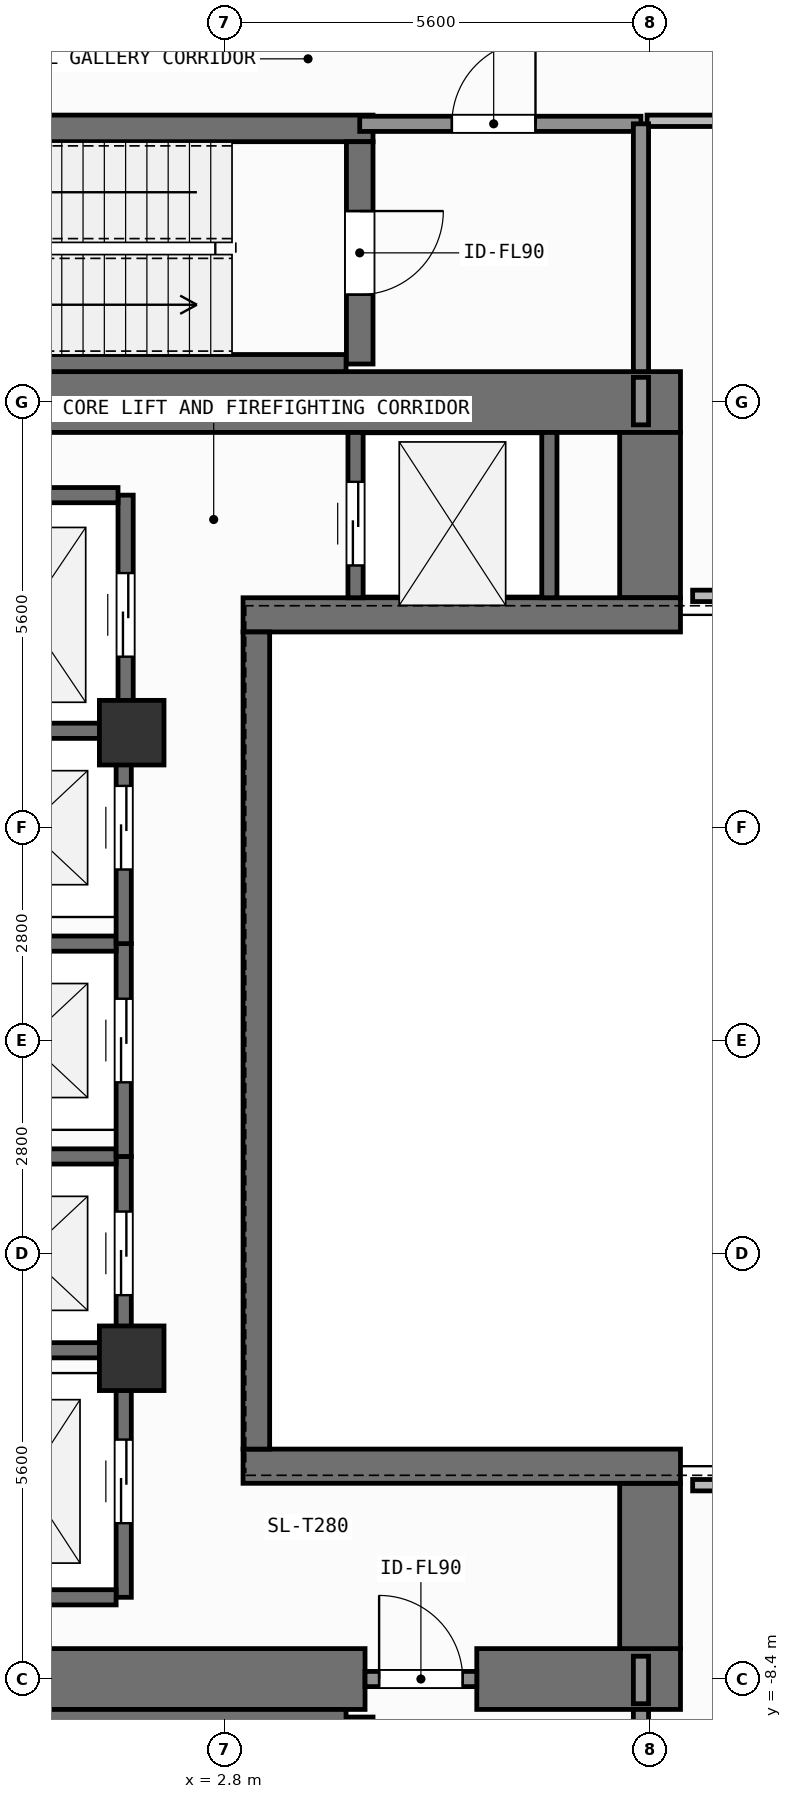
"""IFC4 building model, lengths in metres.
Left out: names, types, materials, properties, quantities, classifications, styles, units other than length and angle.
Written with IfcOpenShell. Run it as: python <this file> out.ifc"""

import sys

from ifc_helpers import new_model, si_unit, direction, frame, frame_2d, origin, origin_2d, place, context, subcontext, project, spatial, rectangle, extrude, element, fill, save


model = new_model("IFC4")
c1 = context("Model", 3, precision=1e-05, world=origin(), true_north=direction((0.0, 1.0)))
c2 = subcontext(c1, "Body", "Model", "MODEL_VIEW")
j1 = project(units=[si_unit("LENGTHUNIT", "METRE"), si_unit("PLANEANGLEUNIT", "RADIAN")], contexts=[c1])
p1 = place(None, origin())
s1 = spatial("IfcSite", under=j1, at=p1, CompositionType="ELEMENT")
p2 = place(p1, origin())
s2 = spatial("IfcBuilding", under=s1, at=p2, CompositionType="ELEMENT")
p3 = place(p2, frame((0.0, 0.0, 219.6)))
s3 = spatial("IfcBuildingStorey", under=s2, at=p3, CompositionType="ELEMENT", Elevation=219.6)
p4 = place(p3, frame((-2.62, -8.4, 0.0), z_axis=(0.0, 0.0, 1.0), x_axis=(1.0, 0.0, 0.0)))
e1 = element("IfcWall", 1, at=p4, inside=s3, PredefinedType="SHEAR", context=c2, shape_type="SweptSolid", body=[
    extrude(rectangle(XDim=7.27, YDim=0.8, at=frame_2d((3.635, 0.0))), origin(), (0.0, 0.0, 1.0), 3.9),
])
p5 = place(p3, frame((6.12, -8.4, 0.0), z_axis=(0.0, 0.0, 1.0), x_axis=(1.0, 0.0, 0.0)))
e2 = element("IfcWall", 2, at=p5, inside=s3, PredefinedType="SHEAR", context=c2, shape_type="SweptSolid", body=[
    extrude(rectangle(XDim=2.68, YDim=0.8, at=frame_2d((1.34, 0.0))), origin(), (0.0, 0.0, 1.0), 3.9),
])
p6 = place(p3, frame((-7.55, 8.4, 0.0), z_axis=(0.0, 0.0, 1.0), x_axis=(1.0, 0.0, 0.0)))
e3 = element("IfcWall", 3, at=p6, inside=s3, PredefinedType="SHEAR", context=c2, shape_type="SweptSolid", body=[
    extrude(rectangle(XDim=16.35, YDim=0.8, at=frame_2d((8.175, 0.0))), origin(), (0.0, 0.0, 1.0), 3.9),
])
for number, where, z_axis, x_axis in (
    (4, (8.4, -8.0, 0.0), (0.0, 0.0, 1.0), (0.0, 1.0, 0.0)),
    (5, (8.4, 5.825, 0.0), (0.0, 0.0, 1.0), (0.0, 1.0, 0.0)),
):
    element("IfcWall", number, at=place(p3, frame(where, z_axis=z_axis, x_axis=x_axis)), inside=s3, PredefinedType="SHEAR", context=c2, shape_type="SweptSolid", body=[
        extrude(rectangle(XDim=2.175, YDim=0.8, at=frame_2d((1.087, 0.0))), origin(), (0.0, 0.0, 1.0), 3.9),
    ])
for number, where, z_axis, x_axis in (
    (6, (3.045, -5.6, 0.0), (0.0, 0.0, 1.0), (1.0, 0.0, 0.0)),
    (7, (3.045, 5.6, 0.0), (0.0, 0.0, 1.0), (1.0, 0.0, 0.0)),
):
    element("IfcWall", number, at=place(p3, frame(where, z_axis=z_axis, x_axis=x_axis)), inside=s3, PredefinedType="SHEAR", context=c2, shape_type="SweptSolid", body=[
        extrude(rectangle(XDim=5.755, YDim=0.45, at=frame_2d((2.877, 0.0))), origin(), (0.0, 0.0, 1.0), 3.9),
    ])
p7 = place(p3, frame((3.22, -5.375, 0.0), z_axis=(0.0, 0.0, 1.0), x_axis=(0.0, 1.0, 0.0)))
e8 = element("IfcWall", 8, at=p7, inside=s3, PredefinedType="SHEAR", context=c2, shape_type="SweptSolid", body=[
    extrude(rectangle(XDim=10.75, YDim=0.35, at=frame_2d((5.375, 0.0))), origin(), (0.0, 0.0, 1.0), 3.9),
])
p8 = place(p3, frame((-2.2, -8.913, 0.0), z_axis=(0.0, 0.0, 1.0), x_axis=(1.0, 0.0, 0.0)))
e9 = element("IfcWall", 9, at=p8, inside=s3, PredefinedType="SHEAR", context=c2, shape_type="SweptSolid", body=[
    extrude(rectangle(XDim=6.6, YDim=0.225, at=frame_2d((3.3, 0.0))), origin(), (0.0, 0.0, 1.0), 3.9),
])
p9 = place(p3, frame((4.58, -8.9, 0.0), z_axis=(0.0, 0.0, 1.0), x_axis=(0.0, -1.0, 0.0)))
e10 = element("IfcWall", 10, at=p9, inside=s3, PredefinedType="SHEAR", context=c2, shape_type="SweptSolid", body=[
    extrude(rectangle(XDim=2.925, YDim=0.35, at=frame_2d((1.462, 0.0))), origin(), (0.0, 0.0, 1.0), 3.9),
])
p10 = place(p9, frame((0.913, 0.0, 0.0)))
e11 = element("IfcOpeningElement", 11, at=p10, cuts=e10, PredefinedType="OPENING", context=c2, shape_type="SweptSolid", body=[
    extrude(rectangle(XDim=1.1, YDim=2.15, at=frame_2d((0.55, 1.075))), frame((0.0, 0.185, 0.0), z_axis=(0.0, -1.0, 0.0), x_axis=(1.0, 0.0, 0.0)), (0.0, 0.0, 1.0), 0.37),
])
p11 = place(p3, frame((-2.555, 12.0, 0.0), z_axis=(0.0, 0.0, 1.0), x_axis=(1.0, 0.0, 0.0)))
e12 = element("IfcWall", 12, at=p11, inside=s3, PredefinedType="SHEAR", context=c2, shape_type="SweptSolid", body=[
    extrude(rectangle(XDim=7.31, YDim=0.35, at=frame_2d((3.655, 0.0))), origin(), (0.0, 0.0, 1.0), 3.9),
])
p12 = place(p3, frame((-2.2, 8.913, 0.0), z_axis=(0.0, 0.0, 1.0), x_axis=(1.0, 0.0, 0.0)))
e13 = element("IfcWall", 13, at=p12, inside=s3, PredefinedType="SHEAR", context=c2, shape_type="SweptSolid", body=[
    extrude(rectangle(XDim=6.6, YDim=0.225, at=frame_2d((3.3, 0.0))), origin(), (0.0, 0.0, 1.0), 3.9),
])
p13 = place(p3, frame((4.58, 11.825, 0.0), z_axis=(0.0, 0.0, 1.0), x_axis=(0.0, -1.0, 0.0)))
e14 = element("IfcWall", 14, at=p13, inside=s3, PredefinedType="SHEAR", context=c2, shape_type="SweptSolid", body=[
    extrude(rectangle(XDim=2.925, YDim=0.35, at=frame_2d((1.462, 0.0))), origin(), (0.0, 0.0, 1.0), 3.9),
])
p14 = place(p13, frame((0.913, 0.0, 0.0)))
e15 = element("IfcOpeningElement", 15, at=p14, cuts=e14, PredefinedType="OPENING", context=c2, shape_type="SweptSolid", body=[
    extrude(rectangle(XDim=1.1, YDim=2.15, at=frame_2d((0.55, 1.075))), frame((0.0, 0.185, 0.0), z_axis=(0.0, -1.0, 0.0), x_axis=(1.0, 0.0, 0.0)), (0.0, 0.0, 1.0), 0.37),
])
for number, where, z_axis, x_axis in (
    (16, (1.58, -4.18, 0.0), (0.0, 0.0, 1.0), (1.0, 0.0, 0.0)),
    (17, (1.58, 4.05, 0.0), (0.0, 0.0, 1.0), (1.0, 0.0, 0.0)),
):
    element("IfcColumn", number, at=place(p3, frame(where, z_axis=z_axis, x_axis=x_axis)), inside=s3, PredefinedType="COLUMN", context=c2, shape_type="SweptSolid", body=[
        extrude(rectangle(XDim=0.85, YDim=0.85, at=origin_2d()), origin(), (0.0, 0.0, 1.0), 3.9),
    ])
p15 = place(p3, frame((1.475, -4.275, 0.0), z_axis=(0.0, 0.0, 1.0), x_axis=(0.0, 1.0, 0.0)))
e18 = element("IfcWall", 18, at=p15, inside=s3, PredefinedType="SHEAR", context=c2, shape_type="SweptSolid", body=[
    extrude(rectangle(XDim=2.75, YDim=0.2, at=frame_2d((1.375, 0.0))), origin(), (0.0, 0.0, 1.0), 3.68),
])
p16 = place(p15, frame((0.925, 0.0, 0.0)))
e19 = element("IfcOpeningElement", 19, at=p16, cuts=e18, PredefinedType="OPENING", context=c2, shape_type="SweptSolid", body=[
    extrude(rectangle(XDim=1.1, YDim=2.2, at=frame_2d((0.55, 1.1))), frame((0.0, 0.11, 0.0), z_axis=(0.0, -1.0, 0.0), x_axis=(1.0, 0.0, 0.0)), (0.0, 0.0, 1.0), 0.22),
])
for number, where, z_axis, x_axis in (
    (20, (-0.975, -4.075, 0.0), (0.0, 0.0, 1.0), (1.0, 0.0, 0.0)),
    (21, (-0.975, -1.525, 0.0), (0.0, 0.0, 1.0), (1.0, 0.0, 0.0)),
):
    element("IfcWall", number, at=place(p3, frame(where, z_axis=z_axis, x_axis=x_axis)), inside=s3, PredefinedType="SHEAR", context=c2, shape_type="SweptSolid", body=[
        extrude(rectangle(XDim=2.35, YDim=0.2, at=frame_2d((1.175, 0.0))), origin(), (0.0, 0.0, 1.0), 3.68),
    ])
p17 = place(p3, frame((1.475, -1.525, 0.0), z_axis=(0.0, 0.0, 1.0), x_axis=(0.0, 1.0, 0.0)))
e22 = element("IfcWall", 22, at=p17, inside=s3, PredefinedType="SHEAR", context=c2, shape_type="SweptSolid", body=[
    extrude(rectangle(XDim=2.8, YDim=0.2, at=frame_2d((1.4, 0.0))), origin(), (0.0, 0.0, 1.0), 3.68),
])
p18 = place(p17, frame((0.975, 0.0, 0.0)))
e23 = element("IfcOpeningElement", 23, at=p18, cuts=e22, PredefinedType="OPENING", context=c2, shape_type="SweptSolid", body=[
    extrude(rectangle(XDim=1.1, YDim=2.2, at=frame_2d((0.55, 1.1))), frame((0.0, 0.11, 0.0), z_axis=(0.0, -1.0, 0.0), x_axis=(1.0, 0.0, 0.0)), (0.0, 0.0, 1.0), 0.22),
])
p19 = place(p3, frame((-0.975, 1.275, 0.0), z_axis=(0.0, 0.0, 1.0), x_axis=(1.0, 0.0, 0.0)))
e24 = element("IfcWall", 24, at=p19, inside=s3, PredefinedType="SHEAR", context=c2, shape_type="SweptSolid", body=[
    extrude(rectangle(XDim=2.35, YDim=0.2, at=frame_2d((1.175, 0.0))), origin(), (0.0, 0.0, 1.0), 3.68),
])
p20 = place(p3, frame((1.475, 1.275, 0.0), z_axis=(0.0, 0.0, 1.0), x_axis=(0.0, 1.0, 0.0)))
e25 = element("IfcWall", 25, at=p20, inside=s3, PredefinedType="SHEAR", context=c2, shape_type="SweptSolid", body=[
    extrude(rectangle(XDim=2.8, YDim=0.2, at=frame_2d((1.4, 0.0))), origin(), (0.0, 0.0, 1.0), 3.68),
])
p21 = place(p20, frame((0.975, 0.0, 0.0)))
e26 = element("IfcOpeningElement", 26, at=p21, cuts=e25, PredefinedType="OPENING", context=c2, shape_type="SweptSolid", body=[
    extrude(rectangle(XDim=1.1, YDim=2.2, at=frame_2d((0.55, 1.1))), frame((0.0, 0.11, 0.0), z_axis=(0.0, -1.0, 0.0), x_axis=(1.0, 0.0, 0.0)), (0.0, 0.0, 1.0), 0.22),
])
p22 = place(p3, frame((-0.975, 4.075, 0.0), z_axis=(0.0, 0.0, 1.0), x_axis=(1.0, 0.0, 0.0)))
e27 = element("IfcWall", 27, at=p22, inside=s3, PredefinedType="SHEAR", context=c2, shape_type="SweptSolid", body=[
    extrude(rectangle(XDim=2.35, YDim=0.2, at=frame_2d((1.175, 0.0))), origin(), (0.0, 0.0, 1.0), 3.68),
])
p23 = place(p3, frame((1.5, 4.025, 0.0), z_axis=(0.0, 0.0, 1.0), x_axis=(0.0, 1.0, 0.0)))
e28 = element("IfcWall", 28, at=p23, inside=s3, PredefinedType="SHEAR", context=c2, shape_type="SweptSolid", body=[
    extrude(rectangle(XDim=3.15, YDim=0.2, at=frame_2d((1.575, 0.0))), origin(), (0.0, 0.0, 1.0), 3.68),
])
p24 = place(p23, frame((1.025, 0.0, 0.0)))
e29 = element("IfcOpeningElement", 29, at=p24, cuts=e28, PredefinedType="OPENING", context=c2, shape_type="SweptSolid", body=[
    extrude(rectangle(XDim=1.1, YDim=2.2, at=frame_2d((0.55, 1.1))), frame((0.0, 0.11, 0.0), z_axis=(0.0, -1.0, 0.0), x_axis=(1.0, 0.0, 0.0)), (0.0, 0.0, 1.0), 0.22),
])
p25 = place(p3, frame((-1.0, 7.175, 0.0), z_axis=(0.0, 0.0, 1.0), x_axis=(1.0, 0.0, 0.0)))
e30 = element("IfcWall", 30, at=p25, inside=s3, PredefinedType="SHEAR", context=c2, shape_type="SweptSolid", body=[
    extrude(rectangle(XDim=2.4, YDim=0.2, at=frame_2d((1.2, 0.0))), origin(), (0.0, 0.0, 1.0), 3.68),
])
p26 = place(p3, frame((1.475, -7.325, 0.0), z_axis=(0.0, 0.0, 1.0), x_axis=(0.0, 1.0, 0.0)))
e31 = element("IfcWall", 31, at=p26, inside=s3, PredefinedType="SHEAR", context=c2, shape_type="SweptSolid", body=[
    extrude(rectangle(XDim=3.05, YDim=0.2, at=frame_2d((1.525, 0.0))), origin(), (0.0, 0.0, 1.0), 3.68),
])
p27 = place(p26, frame((0.975, 0.0, 0.0)))
e32 = element("IfcOpeningElement", 32, at=p27, cuts=e31, PredefinedType="OPENING", context=c2, shape_type="SweptSolid", body=[
    extrude(rectangle(XDim=1.1, YDim=2.2, at=frame_2d((0.55, 1.1))), frame((0.0, 0.11, 0.0), z_axis=(0.0, -1.0, 0.0), x_axis=(1.0, 0.0, 0.0)), (0.0, 0.0, 1.0), 0.22),
])
p28 = place(p3, frame((-0.975, -7.325, 0.0), z_axis=(0.0, 0.0, 1.0), x_axis=(1.0, 0.0, 0.0)))
e33 = element("IfcWall", 33, at=p28, inside=s3, PredefinedType="SHEAR", context=c2, shape_type="SweptSolid", body=[
    extrude(rectangle(XDim=2.35, YDim=0.2, at=frame_2d((1.175, 0.0))), origin(), (0.0, 0.0, 1.0), 3.68),
])
p29 = place(p3, frame((4.525, 5.825, 0.0), z_axis=(0.0, 0.0, 1.0), x_axis=(0.0, 1.0, 0.0)))
e34 = element("IfcWall", 34, at=p29, inside=s3, PredefinedType="SHEAR", context=c2, shape_type="SweptSolid", body=[
    extrude(rectangle(XDim=2.175, YDim=0.2, at=frame_2d((1.087, 0.0))), origin(), (0.0, 0.0, 1.0), 3.68),
])
p30 = place(p29, frame((0.425, 0.0, 0.0)))
e35 = element("IfcOpeningElement", 35, at=p30, cuts=e34, PredefinedType="OPENING", context=c2, shape_type="SweptSolid", body=[
    extrude(rectangle(XDim=1.1, YDim=2.2, at=frame_2d((0.55, 1.1))), frame((0.0, 0.11, 0.0), z_axis=(0.0, -1.0, 0.0), x_axis=(1.0, 0.0, 0.0)), (0.0, 0.0, 1.0), 0.22),
])
p31 = place(p3, frame((7.075, 5.825, 0.0), z_axis=(0.0, 0.0, 1.0), x_axis=(0.0, 1.0, 0.0)))
e36 = element("IfcWall", 36, at=p31, inside=s3, PredefinedType="SHEAR", context=c2, shape_type="SweptSolid", body=[
    extrude(rectangle(XDim=2.175, YDim=0.2, at=frame_2d((1.087, 0.0))), origin(), (0.0, 0.0, 1.0), 3.68),
])
p32 = place(p3, frame((4.65, -8.4, 0.0), z_axis=(0.0, 0.0, 1.0), x_axis=(1.0, 0.0, 0.0)))
e37 = element("IfcWall", 37, at=p32, inside=s3, PredefinedType="SOLIDWALL", context=c2, shape_type="SweptSolid", body=[
    extrude(rectangle(XDim=1.47, YDim=0.2, at=frame_2d((0.735, 0.0))), origin(), (0.0, 0.0, 1.0), 2.82),
])
p33 = place(p32, frame((0.185, 0.0, 0.0)))
e38 = element("IfcOpeningElement", 38, at=p33, cuts=e37, PredefinedType="OPENING", context=c2, shape_type="SweptSolid", body=[
    extrude(rectangle(XDim=1.1, YDim=2.15, at=frame_2d((0.55, 1.075))), frame((0.0, 0.11, 0.0), z_axis=(0.0, -1.0, 0.0), x_axis=(1.0, 0.0, 0.0)), (0.0, 0.0, 1.0), 0.22),
])
p34 = place(p3, frame((4.58, 12.06, 0.0), z_axis=(0.0, 0.0, 1.0), x_axis=(1.0, 0.0, 0.0)))
e39 = element("IfcWall", 39, at=p34, inside=s3, PredefinedType="SOLIDWALL", context=c2, shape_type="SweptSolid", body=[
    extrude(rectangle(XDim=3.7, YDim=0.2, at=frame_2d((1.85, 0.0))), origin(), (0.0, 0.0, 1.0), 3.68),
])
p35 = place(p34, frame((1.212, 0.0, 0.0)))
e40 = element("IfcOpeningElement", 40, at=p35, cuts=e39, PredefinedType="OPENING", context=c2, shape_type="SweptSolid", body=[
    extrude(rectangle(XDim=1.1, YDim=2.15, at=frame_2d((0.55, 1.075))), frame((0.0, 0.11, 0.0), z_axis=(0.0, -1.0, 0.0), x_axis=(1.0, 0.0, 0.0)), (0.0, 0.0, 1.0), 0.22),
])
p36 = place(p3, frame((8.36, 12.1, 0.0), z_axis=(0.0, 0.0, 1.0), x_axis=(1.0, 0.0, 0.0)))
e41 = element("IfcWall", 41, at=p36, inside=s3, PredefinedType="PARTITIONING", context=c2, shape_type="SweptSolid", body=[
    extrude(rectangle(XDim=7.22, YDim=0.15, at=frame_2d((3.61, 0.0))), origin(), (0.0, 0.0, 1.0), 3.68),
])
p37 = place(p36, frame((3.513, 0.0, 0.0)))
e42 = element("IfcOpeningElement", 42, at=p37, cuts=e41, PredefinedType="OPENING", context=c2, shape_type="SweptSolid", body=[
    extrude(rectangle(XDim=0.9, YDim=2.1, at=frame_2d((0.45, 1.05))), frame((0.0, 0.085, 0.0), z_axis=(0.0, -1.0, 0.0), x_axis=(1.0, 0.0, 0.0)), (0.0, 0.0, 1.0), 0.17),
])
for number, where, z_axis, x_axis in (
    (43, (8.28, -12.06, 0.0), (0.0, 0.0, 1.0), (0.0, 1.0, 0.0)),
    (44, (8.28, 8.8, 0.0), (0.0, 0.0, 1.0), (0.0, 1.0, 0.0)),
):
    element("IfcWall", number, at=place(p3, frame(where, z_axis=z_axis, x_axis=x_axis)), inside=s3, PredefinedType="SOLIDWALL", context=c2, shape_type="SweptSolid", body=[
        extrude(rectangle(XDim=3.26, YDim=0.2, at=frame_2d((1.63, 0.0))), origin(), (0.0, 0.0, 1.0), 3.68),
    ])
p38 = place(p3, frame((8.28, -8.725, 0.0), z_axis=(0.0, 0.0, 1.0), x_axis=(0.0, 1.0, 0.0)))
e45 = element("IfcWall", 45, at=p38, inside=s3, PredefinedType="SOLIDWALL", context=c2, shape_type="SweptSolid", body=[
    extrude(rectangle(XDim=0.625, YDim=0.2, at=frame_2d((0.312, 0.0))), origin(), (0.0, 0.0, 1.0), 3.68),
])
p39 = place(p3, frame((8.96, -5.85, 0.0), z_axis=(0.0, 0.0, 1.0), x_axis=(1.0, 0.0, 0.0)))
e46 = element("IfcWall", 46, at=p39, inside=s3, PredefinedType="PARTITIONING", context=c2, shape_type="SweptSolid", body=[
    extrude(rectangle(XDim=6.62, YDim=0.15, at=frame_2d((3.31, 0.0))), origin(), (0.0, 0.0, 1.0), 3.68),
])
p40 = place(p3, frame((8.28, 8.1, 0.0), z_axis=(0.0, 0.0, 1.0), x_axis=(0.0, 1.0, 0.0)))
e47 = element("IfcWall", 47, at=p40, inside=s3, PredefinedType="SOLIDWALL", context=c2, shape_type="SweptSolid", body=[
    extrude(rectangle(XDim=0.625, YDim=0.2, at=frame_2d((0.312, 0.0))), origin(), (0.0, 0.0, 1.0), 3.68),
])
p41 = place(p3, frame((8.96, 5.85, 0.0), z_axis=(0.0, 0.0, 1.0), x_axis=(1.0, 0.0, 0.0)))
e48 = element("IfcWall", 48, at=p41, inside=s3, PredefinedType="PARTITIONING", context=c2, shape_type="SweptSolid", body=[
    extrude(rectangle(XDim=6.62, YDim=0.15, at=frame_2d((3.31, 0.0))), origin(), (0.0, 0.0, 1.0), 3.68),
])
p42 = place(p16, origin())
e49 = element("IfcDoor", 49, at=p42, inside=s3, OperationType="SLIDING_TO_LEFT", PredefinedType="DOOR", context=c2, shape_type="SweptSolid", body=[
    extrude(rectangle(XDim=1.1, YDim=2.2, at=frame_2d((0.55, 1.1))), frame((0.0, 0.025, 0.0), z_axis=(0.0, -1.0, 0.0), x_axis=(1.0, 0.0, 0.0)), (0.0, 0.0, 1.0), 0.05),
])
fill(e19, e49)
p43 = place(p18, origin())
e50 = element("IfcDoor", 50, at=p43, inside=s3, OperationType="SLIDING_TO_LEFT", PredefinedType="DOOR", context=c2, shape_type="SweptSolid", body=[
    extrude(rectangle(XDim=1.1, YDim=2.2, at=frame_2d((0.55, 1.1))), frame((0.0, 0.025, 0.0), z_axis=(0.0, -1.0, 0.0), x_axis=(1.0, 0.0, 0.0)), (0.0, 0.0, 1.0), 0.05),
])
fill(e23, e50)
p44 = place(p21, origin())
e51 = element("IfcDoor", 51, at=p44, inside=s3, OperationType="SLIDING_TO_LEFT", PredefinedType="DOOR", context=c2, shape_type="SweptSolid", body=[
    extrude(rectangle(XDim=1.1, YDim=2.2, at=frame_2d((0.55, 1.1))), frame((0.0, 0.025, 0.0), z_axis=(0.0, -1.0, 0.0), x_axis=(1.0, 0.0, 0.0)), (0.0, 0.0, 1.0), 0.05),
])
fill(e26, e51)
p45 = place(p24, origin())
e52 = element("IfcDoor", 52, at=p45, inside=s3, OperationType="SLIDING_TO_LEFT", PredefinedType="DOOR", context=c2, shape_type="SweptSolid", body=[
    extrude(rectangle(XDim=1.1, YDim=2.2, at=frame_2d((0.55, 1.1))), frame((0.0, 0.025, 0.0), z_axis=(0.0, -1.0, 0.0), x_axis=(1.0, 0.0, 0.0)), (0.0, 0.0, 1.0), 0.05),
])
fill(e29, e52)
p46 = place(p27, origin())
e53 = element("IfcDoor", 53, at=p46, inside=s3, OperationType="SLIDING_TO_LEFT", PredefinedType="DOOR", context=c2, shape_type="SweptSolid", body=[
    extrude(rectangle(XDim=1.1, YDim=2.2, at=frame_2d((0.55, 1.1))), frame((0.0, 0.025, 0.0), z_axis=(0.0, -1.0, 0.0), x_axis=(1.0, 0.0, 0.0)), (0.0, 0.0, 1.0), 0.05),
])
fill(e32, e53)
p47 = place(p30, origin())
e54 = element("IfcDoor", 54, at=p47, inside=s3, OperationType="SLIDING_TO_LEFT", PredefinedType="DOOR", context=c2, shape_type="SweptSolid", body=[
    extrude(rectangle(XDim=1.1, YDim=2.2, at=frame_2d((0.55, 1.1))), frame((0.0, 0.025, 0.0), z_axis=(0.0, -1.0, 0.0), x_axis=(1.0, 0.0, 0.0)), (0.0, 0.0, 1.0), 0.05),
])
fill(e35, e54)
p48 = place(p14, origin())
e55 = element("IfcDoor", 55, at=p48, inside=s3, OperationType="SINGLE_SWING_LEFT", PredefinedType="DOOR", context=c2, shape_type="SweptSolid", body=[
    extrude(rectangle(XDim=1.1, YDim=2.15, at=frame_2d((0.55, 1.075))), frame((0.0, 0.025, 0.0), z_axis=(0.0, -1.0, 0.0), x_axis=(1.0, 0.0, 0.0)), (0.0, 0.0, 1.0), 0.05),
])
fill(e15, e55)
p49 = place(p33, origin())
e56 = element("IfcDoor", 56, at=p49, inside=s3, OperationType="SINGLE_SWING_LEFT", PredefinedType="DOOR", context=c2, shape_type="SweptSolid", body=[
    extrude(rectangle(XDim=1.1, YDim=2.15, at=frame_2d((0.55, 1.075))), frame((0.0, 0.025, 0.0), z_axis=(0.0, -1.0, 0.0), x_axis=(1.0, 0.0, 0.0)), (0.0, 0.0, 1.0), 0.05),
])
fill(e38, e56)
p50 = place(p35, origin())
e57 = element("IfcDoor", 57, at=p50, inside=s3, OperationType="SINGLE_SWING_RIGHT", PredefinedType="DOOR", context=c2, shape_type="SweptSolid", body=[
    extrude(rectangle(XDim=1.1, YDim=2.15, at=frame_2d((0.55, 1.075))), frame((0.0, 0.025, 0.0), z_axis=(0.0, -1.0, 0.0), x_axis=(1.0, 0.0, 0.0)), (0.0, 0.0, 1.0), 0.05),
])
fill(e40, e57)
save(model, sys.argv[1])
